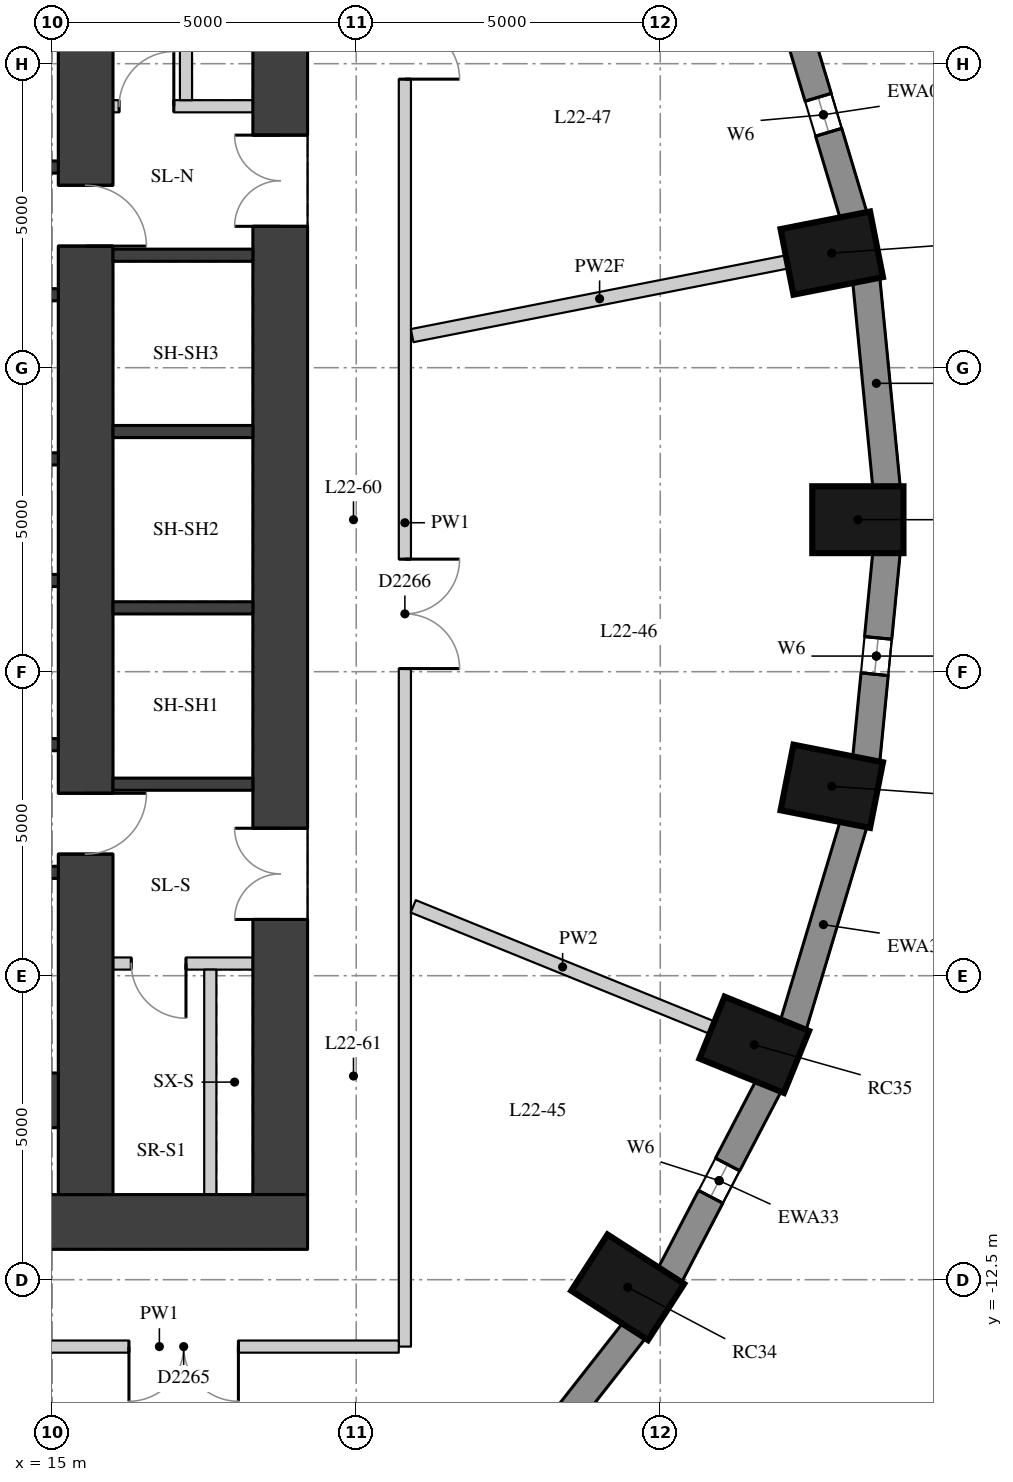
"""IFC4 building model, lengths in metres.
Left out: names, types, materials, properties, quantities, classifications, styles, units other than length and angle.
Written with IfcOpenShell. Run it as: python <this file> out.ifc"""

import sys

from ifc_helpers import new_model, si_unit, direction, frame, frame_2d, origin, origin_2d, place, context, subcontext, project, spatial, rectangle, extrude, element, fill, save


model = new_model("IFC4")
c1 = context("Model", 3, precision=1e-05, world=origin(), true_north=direction((0.0, 1.0)))
c2 = subcontext(c1, "Body", "Model", "MODEL_VIEW")
j1 = project(units=[si_unit("LENGTHUNIT", "METRE"), si_unit("PLANEANGLEUNIT", "RADIAN")], contexts=[c1])
p1 = place(None, origin())
s1 = spatial("IfcSite", under=j1, at=p1, CompositionType="ELEMENT")
p2 = place(p1, origin())
s2 = spatial("IfcBuilding", under=s1, at=p2, CompositionType="ELEMENT")
p3 = place(p2, frame((0.0, 0.0, 81.1)))
s3 = spatial("IfcBuildingStorey", under=s2, at=p3, CompositionType="ELEMENT", Elevation=81.1)
for number, where, z_axis, x_axis in (
    (1, (28.25, 0.0, 0.0), (0.0, 0.0, 1.0), (1.0, 0.0, 0.0)),
    (2, (27.821, 4.385, 0.0), (0.0, 0.0, 1.0), (0.981, 0.193, 0.0)),
    (3, (24.465, -12.625, 0.0), (0.0, 0.0, 1.0), (0.841, -0.541, 0.0)),
    (4, (26.546, -8.636, 0.0), (0.0, 0.0, 1.0), (0.927, -0.376, 0.0)),
    (5, (27.821, -4.385, 0.0), (0.0, 0.0, 1.0), (0.981, -0.193, 0.0)),
):
    element("IfcColumn", number, at=place(p3, frame(where, z_axis=z_axis, x_axis=x_axis)), inside=s3, PredefinedType="COLUMN", context=c2, shape_type="SweptSolid", body=[
        extrude(rectangle(XDim=1.5, YDim=1.1, at=origin_2d()), origin(), (0.0, 0.0, 1.0), 3.3),
    ])
p4 = place(p3, frame((28.722, 0.53, 0.0), z_axis=(0.0, 0.0, 1.0), x_axis=(-0.097389581596, 0.995246336038, 0.0)))
e6 = element("IfcWall", 6, at=p4, inside=s3, PredefinedType="SOLIDWALL", context=c2, shape_type="SweptSolid", body=[
    extrude(rectangle(XDim=3.442, YDim=0.45, at=frame_2d((1.721, 0.0))), origin(), (0.0, 0.0, 1.0), 2.85),
])
p5 = place(p3, frame((28.182, 4.996, 0.0), z_axis=(0.0, 0.0, 1.0), x_axis=(-0.287064133733, 0.957911364963, 0.0)))
e7 = element("IfcWall", 7, at=p5, inside=s3, PredefinedType="SOLIDWALL", context=c2, shape_type="SweptSolid", body=[
    extrude(rectangle(XDim=3.473, YDim=0.45, at=frame_2d((1.737, 0.0))), origin(), (0.0, 0.0, 1.0), 2.85),
])
p6 = place(p5, frame((1.437, 0.0, 0.4)))
e8 = element("IfcOpeningElement", 8, at=p6, cuts=e7, PredefinedType="OPENING", context=c2, shape_type="SweptSolid", body=[
    extrude(rectangle(XDim=0.6, YDim=1.75, at=frame_2d((0.3, 0.875))), frame((0.0, 0.235, 0.0), z_axis=(0.0, -1.0, 0.0), x_axis=(1.0, 0.0, 0.0)), (0.0, 0.0, 1.0), 0.47),
])
p7 = place(p3, frame((22.352, -16.17, 0.0), z_axis=(0.0, 0.0, 1.0), x_axis=(0.616661975264, 0.787228053529, 0.0)))
e9 = element("IfcWall", 9, at=p7, inside=s3, PredefinedType="SOLIDWALL", context=c2, shape_type="SweptSolid", body=[
    extrude(rectangle(XDim=3.61, YDim=0.45, at=frame_2d((1.805, 0.0))), origin(), (0.0, 0.0, 1.0), 2.85),
])
p8 = place(p3, frame((25.152, -12.437, 0.0), z_axis=(0.0, 0.0, 1.0), x_axis=(0.462492775226, 0.886623050041, 0.0)))
e10 = element("IfcWall", 10, at=p8, inside=s3, PredefinedType="SOLIDWALL", context=c2, shape_type="SweptSolid", body=[
    extrude(rectangle(XDim=3.532, YDim=0.45, at=frame_2d((1.766, 0.0))), origin(), (0.0, 0.0, 1.0), 2.85),
])
p9 = place(p8, frame((1.466, 0.0, 0.4)))
e11 = element("IfcOpeningElement", 11, at=p9, cuts=e10, PredefinedType="OPENING", context=c2, shape_type="SweptSolid", body=[
    extrude(rectangle(XDim=0.6, YDim=1.75, at=frame_2d((0.3, 0.875))), frame((0.0, 0.235, 0.0), z_axis=(0.0, -1.0, 0.0), x_axis=(1.0, 0.0, 0.0)), (0.0, 0.0, 1.0), 0.47),
])
p10 = place(p3, frame((27.185, -8.323, 0.0), z_axis=(0.0, 0.0, 1.0), x_axis=(0.287064133733, 0.957911364963, 0.0)))
e12 = element("IfcWall", 12, at=p10, inside=s3, PredefinedType="SOLIDWALL", context=c2, shape_type="SweptSolid", body=[
    extrude(rectangle(XDim=3.473, YDim=0.45, at=frame_2d((1.737, 0.0))), origin(), (0.0, 0.0, 1.0), 2.85),
])
p11 = place(p3, frame((28.387, -3.956, 0.0), z_axis=(0.0, 0.0, 1.0), x_axis=(0.097389581596, 0.995246336038, 0.0)))
e13 = element("IfcWall", 13, at=p11, inside=s3, PredefinedType="SOLIDWALL", context=c2, shape_type="SweptSolid", body=[
    extrude(rectangle(XDim=3.442, YDim=0.45, at=frame_2d((1.721, 0.0))), origin(), (0.0, 0.0, 1.0), 2.85),
])
p12 = place(p11, frame((1.421, 0.0, 0.4)))
e14 = element("IfcOpeningElement", 14, at=p12, cuts=e13, PredefinedType="OPENING", context=c2, shape_type="SweptSolid", body=[
    extrude(rectangle(XDim=0.6, YDim=1.75, at=frame_2d((0.3, 0.875))), frame((0.0, 0.235, 0.0), z_axis=(0.0, -1.0, 0.0), x_axis=(1.0, 0.0, 0.0)), (0.0, 0.0, 1.0), 0.47),
])
p13 = place(p3, frame((18.75, -11.1, 0.0), z_axis=(0.0, 0.0, 1.0), x_axis=(0.0, 1.0, 0.0)))
e15 = element("IfcWall", 15, at=p13, inside=s3, PredefinedType="SHEAR", context=c2, shape_type="SweptSolid", body=[
    extrude(rectangle(XDim=22.2, YDim=0.9, at=frame_2d((11.1, 0.0))), origin(), (0.0, 0.0, 1.0), 2.85),
])
p14 = place(p13, frame((15.925, 0.0, 0.0)))
e16 = element("IfcOpeningElement", 16, at=p14, cuts=e15, PredefinedType="OPENING", context=c2, shape_type="SweptSolid", body=[
    extrude(rectangle(XDim=1.5, YDim=2.1, at=frame_2d((0.75, 1.05))), frame((0.0, 0.46, 0.0), z_axis=(0.0, -1.0, 0.0), x_axis=(1.0, 0.0, 0.0)), (0.0, 0.0, 1.0), 0.92),
])
p15 = place(p13, frame((4.525, 0.0, 0.0)))
e17 = element("IfcOpeningElement", 17, at=p15, cuts=e15, PredefinedType="OPENING", context=c2, shape_type="SweptSolid", body=[
    extrude(rectangle(XDim=1.5, YDim=2.1, at=frame_2d((0.75, 1.05))), frame((0.0, 0.46, 0.0), z_axis=(0.0, -1.0, 0.0), x_axis=(1.0, 0.0, 0.0)), (0.0, 0.0, 1.0), 0.92),
])
p16 = place(p3, frame((4.0, -11.55, 0.0), z_axis=(0.0, 0.0, 1.0), x_axis=(1.0, 0.0, 0.0)))
e18 = element("IfcWall", 18, at=p16, inside=s3, PredefinedType="SHEAR", context=c2, shape_type="SweptSolid", body=[
    extrude(rectangle(XDim=15.2, YDim=0.9, at=frame_2d((7.6, 0.0))), origin(), (0.0, 0.0, 1.0), 2.85),
])
p17 = place(p3, frame((15.55, -11.1, 0.0), z_axis=(0.0, 0.0, 1.0), x_axis=(0.0, 1.0, 0.0)))
e19 = element("IfcWall", 19, at=p17, inside=s3, PredefinedType="SHEAR", context=c2, shape_type="SweptSolid", body=[
    extrude(rectangle(XDim=22.2, YDim=0.9, at=frame_2d((11.1, 0.0))), origin(), (0.0, 0.0, 1.0), 2.85),
])
p18 = place(p17, frame((15.6, 0.0, 0.0)))
e20 = element("IfcOpeningElement", 20, at=p18, cuts=e19, PredefinedType="OPENING", context=c2, shape_type="SweptSolid", body=[
    extrude(rectangle(XDim=1.0, YDim=2.1, at=frame_2d((0.5, 1.05))), frame((0.0, 0.46, 0.0), z_axis=(0.0, -1.0, 0.0), x_axis=(1.0, 0.0, 0.0)), (0.0, 0.0, 1.0), 0.92),
])
p19 = place(p17, frame((5.6, 0.0, 0.0)))
e21 = element("IfcOpeningElement", 21, at=p19, cuts=e19, PredefinedType="OPENING", context=c2, shape_type="SweptSolid", body=[
    extrude(rectangle(XDim=1.0, YDim=2.1, at=frame_2d((0.5, 1.05))), frame((0.0, 0.46, 0.0), z_axis=(0.0, -1.0, 0.0), x_axis=(1.0, 0.0, 0.0)), (0.0, 0.0, 1.0), 0.92),
])
p20 = place(p3, frame((4.9, -9.55, 0.0), z_axis=(0.0, 0.0, 1.0), x_axis=(1.0, 0.0, 0.0)))
e22 = element("IfcWall", 22, at=p20, inside=s3, PredefinedType="SHEAR", context=c2, shape_type="SweptSolid", body=[
    extrude(rectangle(XDim=10.2, YDim=0.9, at=frame_2d((5.1, 0.0))), origin(), (0.0, 0.0, 1.0), 2.85),
])
p21 = place(p3, frame((4.9, 5.8, 0.0), z_axis=(0.0, 0.0, 1.0), x_axis=(1.0, 0.0, 0.0)))
e23 = element("IfcWall", 23, at=p21, inside=s3, PredefinedType="SHEAR", context=c2, shape_type="SweptSolid", body=[
    extrude(rectangle(XDim=10.2, YDim=0.2, at=frame_2d((5.1, 0.0))), origin(), (0.0, 0.0, 1.0), 2.85),
])
p22 = place(p21, frame((6.75, 0.0, 0.0)))
e24 = element("IfcOpeningElement", 24, at=p22, cuts=e23, PredefinedType="OPENING", context=c2, shape_type="SweptSolid", body=[
    extrude(rectangle(XDim=1.1, YDim=2.1, at=frame_2d((0.55, 1.05))), frame((0.0, 0.11, 0.0), z_axis=(0.0, -1.0, 0.0), x_axis=(1.0, 0.0, 0.0)), (0.0, 0.0, 1.0), 0.22),
])
p23 = place(p21, frame((8.75, 0.0, 0.0)))
e25 = element("IfcOpeningElement", 25, at=p23, cuts=e23, PredefinedType="OPENING", context=c2, shape_type="SweptSolid", body=[
    extrude(rectangle(XDim=1.1, YDim=2.1, at=frame_2d((0.55, 1.05))), frame((0.0, 0.11, 0.0), z_axis=(0.0, -1.0, 0.0), x_axis=(1.0, 0.0, 0.0)), (0.0, 0.0, 1.0), 0.22),
])
p24 = place(p3, frame((4.9, 3.7, 0.0), z_axis=(0.0, 0.0, 1.0), x_axis=(1.0, 0.0, 0.0)))
e26 = element("IfcWall", 26, at=p24, inside=s3, PredefinedType="SHEAR", context=c2, shape_type="SweptSolid", body=[
    extrude(rectangle(XDim=10.2, YDim=0.2, at=frame_2d((5.1, 0.0))), origin(), (0.0, 0.0, 1.0), 2.85),
])
p25 = place(p24, frame((6.3, 0.0, 0.0)))
e27 = element("IfcOpeningElement", 27, at=p25, cuts=e26, PredefinedType="OPENING", context=c2, shape_type="SweptSolid", body=[
    extrude(rectangle(XDim=1.1, YDim=2.1, at=frame_2d((0.55, 1.05))), frame((0.0, 0.11, 0.0), z_axis=(0.0, -1.0, 0.0), x_axis=(1.0, 0.0, 0.0)), (0.0, 0.0, 1.0), 0.22),
])
p26 = place(p24, frame((8.6, 0.0, 0.0)))
e28 = element("IfcOpeningElement", 28, at=p26, cuts=e26, PredefinedType="OPENING", context=c2, shape_type="SweptSolid", body=[
    extrude(rectangle(XDim=1.1, YDim=2.1, at=frame_2d((0.55, 1.05))), frame((0.0, 0.11, 0.0), z_axis=(0.0, -1.0, 0.0), x_axis=(1.0, 0.0, 0.0)), (0.0, 0.0, 1.0), 0.22),
])
for number, where, z_axis, x_axis in (
    (29, (4.9, 1.0, 0.0), (0.0, 0.0, 1.0), (1.0, 0.0, 0.0)),
    (30, (4.9, -1.0, 0.0), (0.0, 0.0, 1.0), (1.0, 0.0, 0.0)),
):
    element("IfcWall", number, at=place(p3, frame(where, z_axis=z_axis, x_axis=x_axis)), inside=s3, PredefinedType="SHEAR", context=c2, shape_type="SweptSolid", body=[
        extrude(rectangle(XDim=10.2, YDim=0.2, at=frame_2d((5.1, 0.0))), origin(), (0.0, 0.0, 1.0), 2.85),
    ])
p27 = place(p3, frame((4.9, -3.7, 0.0), z_axis=(0.0, 0.0, 1.0), x_axis=(1.0, 0.0, 0.0)))
e31 = element("IfcWall", 31, at=p27, inside=s3, PredefinedType="SHEAR", context=c2, shape_type="SweptSolid", body=[
    extrude(rectangle(XDim=10.2, YDim=0.2, at=frame_2d((5.1, 0.0))), origin(), (0.0, 0.0, 1.0), 2.85),
])
p28 = place(p27, frame((6.3, 0.0, 0.0)))
e32 = element("IfcOpeningElement", 32, at=p28, cuts=e31, PredefinedType="OPENING", context=c2, shape_type="SweptSolid", body=[
    extrude(rectangle(XDim=1.1, YDim=2.1, at=frame_2d((0.55, 1.05))), frame((0.0, 0.11, 0.0), z_axis=(0.0, -1.0, 0.0), x_axis=(1.0, 0.0, 0.0)), (0.0, 0.0, 1.0), 0.22),
])
p29 = place(p27, frame((8.6, 0.0, 0.0)))
e33 = element("IfcOpeningElement", 33, at=p29, cuts=e31, PredefinedType="OPENING", context=c2, shape_type="SweptSolid", body=[
    extrude(rectangle(XDim=1.1, YDim=2.1, at=frame_2d((0.55, 1.05))), frame((0.0, 0.11, 0.0), z_axis=(0.0, -1.0, 0.0), x_axis=(1.0, 0.0, 0.0)), (0.0, 0.0, 1.0), 0.22),
])
p30 = place(p3, frame((4.9, -5.8, 0.0), z_axis=(0.0, 0.0, 1.0), x_axis=(1.0, 0.0, 0.0)))
e34 = element("IfcWall", 34, at=p30, inside=s3, PredefinedType="SHEAR", context=c2, shape_type="SweptSolid", body=[
    extrude(rectangle(XDim=10.2, YDim=0.2, at=frame_2d((5.1, 0.0))), origin(), (0.0, 0.0, 1.0), 2.85),
])
for number, where, z_axis, x_axis in (
    (35, (16.0, -4.35, 0.0), (0.0, 0.0, 1.0), (1.0, 0.0, 0.0)),
    (36, (16.0, -1.45, 0.0), (0.0, 0.0, 1.0), (1.0, 0.0, 0.0)),
    (37, (16.0, 1.45, 0.0), (0.0, 0.0, 1.0), (1.0, 0.0, 0.0)),
    (38, (16.0, 4.35, 0.0), (0.0, 0.0, 1.0), (1.0, 0.0, 0.0)),
):
    element("IfcWall", number, at=place(p3, frame(where, z_axis=z_axis, x_axis=x_axis)), inside=s3, PredefinedType="SHEAR", context=c2, shape_type="SweptSolid", body=[
        extrude(rectangle(XDim=2.3, YDim=0.2, at=frame_2d((1.15, 0.0))), origin(), (0.0, 0.0, 1.0), 2.85),
    ])
p31 = place(p3, frame((16.0, 6.8, 0.0), z_axis=(0.0, 0.0, 1.0), x_axis=(1.0, 0.0, 0.0)))
e39 = element("IfcWall", 39, at=p31, inside=s3, PredefinedType="PARTITIONING", context=c2, shape_type="SweptSolid", body=[
    extrude(rectangle(XDim=2.3, YDim=0.2, at=frame_2d((1.15, 0.0))), origin(), (0.0, 0.0, 1.0), 2.85),
])
p32 = place(p31, frame((0.1, 0.0, 0.0)))
e40 = element("IfcOpeningElement", 40, at=p32, cuts=e39, PredefinedType="OPENING", context=c2, shape_type="SweptSolid", body=[
    extrude(rectangle(XDim=0.9, YDim=2.1, at=frame_2d((0.45, 1.05))), frame((0.0, 0.11, 0.0), z_axis=(0.0, -1.0, 0.0), x_axis=(1.0, 0.0, 0.0)), (0.0, 0.0, 1.0), 0.22),
])
p33 = place(p3, frame((17.2, 6.9, 0.0), z_axis=(0.0, 0.0, 1.0), x_axis=(0.0, 1.0, 0.0)))
e41 = element("IfcWall", 41, at=p33, inside=s3, PredefinedType="PARTITIONING", context=c2, shape_type="SweptSolid", body=[
    extrude(rectangle(XDim=4.2, YDim=0.2, at=frame_2d((2.1, 0.0))), origin(), (0.0, 0.0, 1.0), 2.85),
])
p34 = place(p3, frame((16.0, -7.3, 0.0), z_axis=(0.0, 0.0, 1.0), x_axis=(1.0, 0.0, 0.0)))
e42 = element("IfcWall", 42, at=p34, inside=s3, PredefinedType="PARTITIONING", context=c2, shape_type="SweptSolid", body=[
    extrude(rectangle(XDim=2.3, YDim=0.2, at=frame_2d((1.15, 0.0))), origin(), (0.0, 0.0, 1.0), 2.85),
])
p35 = place(p34, frame((0.3, 0.0, 0.0)))
e43 = element("IfcOpeningElement", 43, at=p35, cuts=e42, PredefinedType="OPENING", context=c2, shape_type="SweptSolid", body=[
    extrude(rectangle(XDim=0.9, YDim=2.1, at=frame_2d((0.45, 1.05))), frame((0.0, 0.11, 0.0), z_axis=(0.0, -1.0, 0.0), x_axis=(1.0, 0.0, 0.0)), (0.0, 0.0, 1.0), 0.22),
])
p36 = place(p3, frame((17.6, -11.1, 0.0), z_axis=(0.0, 0.0, 1.0), x_axis=(0.0, 1.0, 0.0)))
e44 = element("IfcWall", 44, at=p36, inside=s3, PredefinedType="PARTITIONING", context=c2, shape_type="SweptSolid", body=[
    extrude(rectangle(XDim=3.7, YDim=0.2, at=frame_2d((1.85, 0.0))), origin(), (0.0, 0.0, 1.0), 2.85),
])
p37 = place(p3, frame((20.8, 13.5, 0.0), z_axis=(0.0, 0.0, 1.0), x_axis=(0.0, -1.0, 0.0)))
e45 = element("IfcWall", 45, at=p37, inside=s3, PredefinedType="PARTITIONING", context=c2, shape_type="SweptSolid", body=[
    extrude(rectangle(XDim=27.1, YDim=0.2, at=frame_2d((13.55, 0.0))), origin(), (0.0, 0.0, 1.0), 2.85),
])
p38 = place(p37, frame((14.149, 0.0, 0.0)))
e46 = element("IfcOpeningElement", 46, at=p38, cuts=e45, PredefinedType="OPENING", context=c2, shape_type="SweptSolid", body=[
    extrude(rectangle(XDim=1.8, YDim=2.1, at=frame_2d((0.9, 1.05))), frame((0.0, 0.11, 0.0), z_axis=(0.0, -1.0, 0.0), x_axis=(1.0, 0.0, 0.0)), (0.0, 0.0, 1.0), 0.22),
])
p39 = place(p37, frame((4.454, 0.0, 0.0)))
e47 = element("IfcOpeningElement", 47, at=p39, cuts=e45, PredefinedType="OPENING", context=c2, shape_type="SweptSolid", body=[
    extrude(rectangle(XDim=1.8, YDim=2.1, at=frame_2d((0.9, 1.05))), frame((0.0, 0.11, 0.0), z_axis=(0.0, -1.0, 0.0), x_axis=(1.0, 0.0, 0.0)), (0.0, 0.0, 1.0), 0.22),
])
p40 = place(p3, frame((20.7, -13.6, 0.0), z_axis=(0.0, 0.0, 1.0), x_axis=(-1.0, 0.0, 0.0)))
e48 = element("IfcWall", 48, at=p40, inside=s3, PredefinedType="PARTITIONING", context=c2, shape_type="SweptSolid", body=[
    extrude(rectangle(XDim=7.875, YDim=0.2, at=frame_2d((3.938, 0.0))), origin(), (0.0, 0.0, 1.0), 2.85),
])
p41 = place(p40, frame((2.638, 0.0, 0.0)))
e49 = element("IfcOpeningElement", 49, at=p41, cuts=e48, PredefinedType="OPENING", context=c2, shape_type="SweptSolid", body=[
    extrude(rectangle(XDim=1.8, YDim=2.1, at=frame_2d((0.9, 1.05))), frame((0.0, 0.11, 0.0), z_axis=(0.0, -1.0, 0.0), x_axis=(1.0, 0.0, 0.0)), (0.0, 0.0, 1.0), 0.22),
])
p42 = place(p3, frame((27.085, 4.24, 0.0), z_axis=(0.0, 0.0, 1.0), x_axis=(-0.981207724218, -0.192954403772, 0.0)))
e50 = element("IfcWall", 50, at=p42, inside=s3, PredefinedType="PARTITIONING", context=c2, shape_type="SweptSolid", body=[
    extrude(rectangle(XDim=6.283, YDim=0.22, at=frame_2d((3.142, 0.0))), origin(), (0.0, 0.0, 1.0), 2.3),
])
p43 = place(p3, frame((17.708, -18.743, 0.0), z_axis=(0.0, 0.0, 1.0), x_axis=(-0.601177883261, 0.799115231164, 0.0)))
e51 = element("IfcWall", 51, at=p43, inside=s3, PredefinedType="PARTITIONING", context=c2, shape_type="SweptSolid", body=[
    extrude(rectangle(XDim=6.231, YDim=0.22, at=frame_2d((3.116, 0.0))), origin(), (0.0, 0.0, 1.0), 2.85),
])
p44 = place(p3, frame((25.851, -8.354, 0.0), z_axis=(0.0, 0.0, 1.0), x_axis=(-0.926546814299, 0.376179479653, 0.0)))
e52 = element("IfcWall", 52, at=p44, inside=s3, PredefinedType="PARTITIONING", context=c2, shape_type="SweptSolid", body=[
    extrude(rectangle(XDim=5.304, YDim=0.22, at=frame_2d((2.652, 0.0))), origin(), (0.0, 0.0, 1.0), 2.85),
])
p45 = place(p6, origin())
e53 = element("IfcWindow", 53, at=p45, inside=s3, PartitioningType="SINGLE_PANEL", PredefinedType="WINDOW", context=c2, shape_type="SweptSolid", body=[
    extrude(rectangle(XDim=0.6, YDim=1.75, at=frame_2d((0.3, 0.875))), frame((0.0, 0.035, 0.0), z_axis=(0.0, -1.0, 0.0), x_axis=(1.0, 0.0, 0.0)), (0.0, 0.0, 1.0), 0.06),
])
fill(e8, e53)
p46 = place(p9, origin())
e54 = element("IfcWindow", 54, at=p46, inside=s3, PartitioningType="SINGLE_PANEL", PredefinedType="WINDOW", context=c2, shape_type="SweptSolid", body=[
    extrude(rectangle(XDim=0.6, YDim=1.75, at=frame_2d((0.3, 0.875))), frame((0.0, 0.035, 0.0), z_axis=(0.0, -1.0, 0.0), x_axis=(1.0, 0.0, 0.0)), (0.0, 0.0, 1.0), 0.06),
])
fill(e11, e54)
p47 = place(p12, origin())
e55 = element("IfcWindow", 55, at=p47, inside=s3, PartitioningType="SINGLE_PANEL", PredefinedType="WINDOW", context=c2, shape_type="SweptSolid", body=[
    extrude(rectangle(XDim=0.6, YDim=1.75, at=frame_2d((0.3, 0.875))), frame((0.0, 0.035, 0.0), z_axis=(0.0, -1.0, 0.0), x_axis=(1.0, 0.0, 0.0)), (0.0, 0.0, 1.0), 0.06),
])
fill(e14, e55)
p48 = place(p14, origin())
e56 = element("IfcDoor", 56, at=p48, inside=s3, OperationType="DOUBLE_DOOR_SINGLE_SWING", PredefinedType="DOOR", context=c2, shape_type="SweptSolid", body=[
    extrude(rectangle(XDim=1.5, YDim=2.1, at=frame_2d((0.75, 1.05))), frame((0.0, 0.025, 0.0), z_axis=(0.0, -1.0, 0.0), x_axis=(1.0, 0.0, 0.0)), (0.0, 0.0, 1.0), 0.05),
])
fill(e16, e56)
p49 = place(p15, origin())
e57 = element("IfcDoor", 57, at=p49, inside=s3, OperationType="DOUBLE_DOOR_SINGLE_SWING", PredefinedType="DOOR", context=c2, shape_type="SweptSolid", body=[
    extrude(rectangle(XDim=1.5, YDim=2.1, at=frame_2d((0.75, 1.05))), frame((0.0, 0.025, 0.0), z_axis=(0.0, -1.0, 0.0), x_axis=(1.0, 0.0, 0.0)), (0.0, 0.0, 1.0), 0.05),
])
fill(e17, e57)
p50 = place(p18, origin())
e58 = element("IfcDoor", 58, at=p50, inside=s3, OperationType="SINGLE_SWING_RIGHT", PredefinedType="DOOR", context=c2, shape_type="SweptSolid", body=[
    extrude(rectangle(XDim=1.0, YDim=2.1, at=frame_2d((0.5, 1.05))), frame((0.0, 0.025, 0.0), z_axis=(0.0, -1.0, 0.0), x_axis=(1.0, 0.0, 0.0)), (0.0, 0.0, 1.0), 0.05),
])
fill(e20, e58)
p51 = place(p32, origin())
e59 = element("IfcDoor", 59, at=p51, inside=s3, OperationType="SINGLE_SWING_RIGHT", PredefinedType="DOOR", context=c2, shape_type="SweptSolid", body=[
    extrude(rectangle(XDim=0.9, YDim=2.1, at=frame_2d((0.45, 1.05))), frame((0.0, 0.025, 0.0), z_axis=(0.0, -1.0, 0.0), x_axis=(1.0, 0.0, 0.0)), (0.0, 0.0, 1.0), 0.05),
])
fill(e40, e59)
p52 = place(p19, origin())
e60 = element("IfcDoor", 60, at=p52, inside=s3, OperationType="SINGLE_SWING_LEFT", PredefinedType="DOOR", context=c2, shape_type="SweptSolid", body=[
    extrude(rectangle(XDim=1.0, YDim=2.1, at=frame_2d((0.5, 1.05))), frame((0.0, 0.025, 0.0), z_axis=(0.0, -1.0, 0.0), x_axis=(1.0, 0.0, 0.0)), (0.0, 0.0, 1.0), 0.05),
])
fill(e21, e60)
p53 = place(p35, origin())
e61 = element("IfcDoor", 61, at=p53, inside=s3, OperationType="SINGLE_SWING_LEFT", PredefinedType="DOOR", context=c2, shape_type="SweptSolid", body=[
    extrude(rectangle(XDim=0.9, YDim=2.1, at=frame_2d((0.45, 1.05))), frame((0.0, 0.025, 0.0), z_axis=(0.0, -1.0, 0.0), x_axis=(1.0, 0.0, 0.0)), (0.0, 0.0, 1.0), 0.05),
])
fill(e43, e61)
p54 = place(p41, origin())
e62 = element("IfcDoor", 62, at=p54, inside=s3, OperationType="DOUBLE_DOOR_SINGLE_SWING", PredefinedType="DOOR", context=c2, shape_type="SweptSolid", body=[
    extrude(rectangle(XDim=1.8, YDim=2.1, at=frame_2d((0.9, 1.05))), frame((0.0, 0.025, 0.0), z_axis=(0.0, -1.0, 0.0), x_axis=(1.0, 0.0, 0.0)), (0.0, 0.0, 1.0), 0.05),
])
fill(e49, e62)
p55 = place(p38, origin())
e63 = element("IfcDoor", 63, at=p55, inside=s3, OperationType="DOUBLE_DOOR_SINGLE_SWING", PredefinedType="DOOR", context=c2, shape_type="SweptSolid", body=[
    extrude(rectangle(XDim=1.8, YDim=2.1, at=frame_2d((0.9, 1.05))), frame((0.0, 0.025, 0.0), z_axis=(0.0, -1.0, 0.0), x_axis=(1.0, 0.0, 0.0)), (0.0, 0.0, 1.0), 0.05),
])
fill(e46, e63)
p56 = place(p39, origin())
e64 = element("IfcDoor", 64, at=p56, inside=s3, OperationType="DOUBLE_DOOR_SINGLE_SWING", PredefinedType="DOOR", context=c2, shape_type="SweptSolid", body=[
    extrude(rectangle(XDim=1.8, YDim=2.1, at=frame_2d((0.9, 1.05))), frame((0.0, 0.025, 0.0), z_axis=(0.0, -1.0, 0.0), x_axis=(1.0, 0.0, 0.0)), (0.0, 0.0, 1.0), 0.05),
])
fill(e47, e64)
save(model, sys.argv[1])
